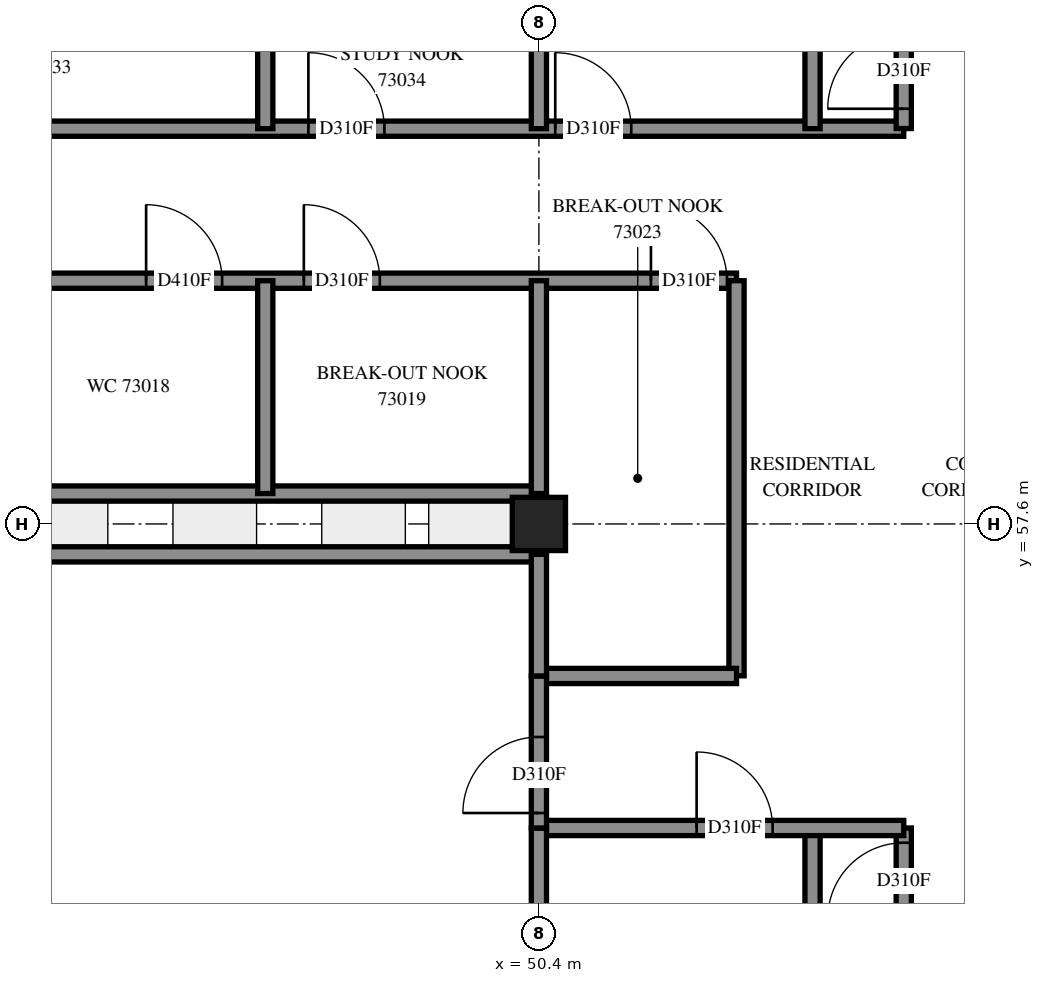
"""IFC4 building model, lengths in metres.
Left out: names, types, materials, properties, quantities, classifications, styles, units other than length and angle.
Written with IfcOpenShell. Run it as: python <this file> out.ifc"""

import sys

from ifc_helpers import new_model, si_unit, direction, frame, frame_2d, origin, origin_2d, place, context, subcontext, project, spatial, rectangle, extrude, element, fill, save


model = new_model("IFC4")
c1 = context("Model", 3, precision=1e-05, world=origin(), true_north=direction((0.0, 1.0)))
c2 = subcontext(c1, "Body", "Model", "MODEL_VIEW")
j1 = project(units=[si_unit("LENGTHUNIT", "METRE"), si_unit("PLANEANGLEUNIT", "RADIAN")], contexts=[c1])
p1 = place(None, origin())
s1 = spatial("IfcSite", under=j1, at=p1, CompositionType="ELEMENT")
p2 = place(p1, origin())
s2 = spatial("IfcBuilding", under=s1, at=p2, CompositionType="ELEMENT")
p3 = place(p2, frame((0.0, 0.0, 267.6)))
s3 = spatial("IfcBuildingStorey", under=s2, at=p3, CompositionType="ELEMENT", Elevation=267.6)
p4 = place(p3, frame((50.4, 57.6, 0.0), z_axis=(0.0, 0.0, 1.0), x_axis=(1.0, 0.0, 0.0)))
e1 = element("IfcColumn", 1, at=p4, inside=s3, PredefinedType="COLUMN", context=c2, shape_type="SweptSolid", body=[
    extrude(rectangle(XDim=0.7, YDim=0.7, at=origin_2d()), origin(), (0.0, 0.0, 1.0), 3.1),
])
p5 = place(p3, frame((36.0, 60.8, 0.0), z_axis=(0.0, 0.0, 1.0), x_axis=(1.0, 0.0, 0.0)))
e2 = element("IfcWall", 2, at=p5, inside=s3, PredefinedType="PARTITIONING", context=c2, shape_type="SweptSolid", body=[
    extrude(rectangle(XDim=17.0, YDim=0.2, at=frame_2d((8.5, 0.0))), origin(), (0.0, 0.0, 1.0), 3.1),
])
p6 = place(p5, frame((2.033, 0.0, 0.0)))
e3 = element("IfcOpeningElement", 3, at=p6, cuts=e2, PredefinedType="OPENING", context=c2, shape_type="SweptSolid", body=[
    extrude(rectangle(XDim=1.0, YDim=2.1, at=frame_2d((0.5, 1.05))), frame((0.0, 0.11, 0.0), z_axis=(0.0, -1.0, 0.0), x_axis=(1.0, 0.0, 0.0)), (0.0, 0.0, 1.0), 0.22),
])
p7 = place(p5, frame((4.107, 0.0, 0.0)))
e4 = element("IfcOpeningElement", 4, at=p7, cuts=e2, PredefinedType="OPENING", context=c2, shape_type="SweptSolid", body=[
    extrude(rectangle(XDim=1.0, YDim=2.1, at=frame_2d((0.5, 1.05))), frame((0.0, 0.11, 0.0), z_axis=(0.0, -1.0, 0.0), x_axis=(1.0, 0.0, 0.0)), (0.0, 0.0, 1.0), 0.22),
])
p8 = place(p5, frame((9.232, 0.0, 0.0)))
e5 = element("IfcOpeningElement", 5, at=p8, cuts=e2, PredefinedType="OPENING", context=c2, shape_type="SweptSolid", body=[
    extrude(rectangle(XDim=1.0, YDim=2.1, at=frame_2d((0.5, 1.05))), frame((0.0, 0.11, 0.0), z_axis=(0.0, -1.0, 0.0), x_axis=(1.0, 0.0, 0.0)), (0.0, 0.0, 1.0), 0.22),
])
p9 = place(p5, frame((11.307, 0.0, 0.0)))
e6 = element("IfcOpeningElement", 6, at=p9, cuts=e2, PredefinedType="OPENING", context=c2, shape_type="SweptSolid", body=[
    extrude(rectangle(XDim=1.0, YDim=2.1, at=frame_2d((0.5, 1.05))), frame((0.0, 0.11, 0.0), z_axis=(0.0, -1.0, 0.0), x_axis=(1.0, 0.0, 0.0)), (0.0, 0.0, 1.0), 0.22),
])
p10 = place(p5, frame((15.874, 0.0, 0.0)))
e7 = element("IfcOpeningElement", 7, at=p10, cuts=e2, PredefinedType="OPENING", context=c2, shape_type="SweptSolid", body=[
    extrude(rectangle(XDim=1.0, YDim=2.1, at=frame_2d((0.5, 1.05))), frame((0.0, 0.11, 0.0), z_axis=(0.0, -1.0, 0.0), x_axis=(1.0, 0.0, 0.0)), (0.0, 0.0, 1.0), 0.22),
])
p11 = place(p3, frame((40.61, 62.8, 0.0), z_axis=(0.0, 0.0, 1.0), x_axis=(1.0, 0.0, 0.0)))
e8 = element("IfcWall", 8, at=p11, inside=s3, PredefinedType="PARTITIONING", context=c2, shape_type="SweptSolid", body=[
    extrude(rectangle(XDim=14.59, YDim=0.2, at=frame_2d((7.295, 0.0))), origin(), (0.0, 0.0, 1.0), 3.1),
])
p12 = place(p11, frame((1.82, 0.0, 0.0)))
e9 = element("IfcOpeningElement", 9, at=p12, cuts=e8, PredefinedType="OPENING", context=c2, shape_type="SweptSolid", body=[
    extrude(rectangle(XDim=1.0, YDim=2.1, at=frame_2d((0.5, 1.05))), frame((0.0, 0.11, 0.0), z_axis=(0.0, -1.0, 0.0), x_axis=(1.0, 0.0, 0.0)), (0.0, 0.0, 1.0), 0.22),
])
p13 = place(p11, frame((6.758, 0.0, 0.0)))
e10 = element("IfcOpeningElement", 10, at=p13, cuts=e8, PredefinedType="OPENING", context=c2, shape_type="SweptSolid", body=[
    extrude(rectangle(XDim=1.0, YDim=2.1, at=frame_2d((0.5, 1.05))), frame((0.0, 0.11, 0.0), z_axis=(0.0, -1.0, 0.0), x_axis=(1.0, 0.0, 0.0)), (0.0, 0.0, 1.0), 0.22),
])
p14 = place(p11, frame((10.005, 0.0, 0.0)))
e11 = element("IfcOpeningElement", 11, at=p14, cuts=e8, PredefinedType="OPENING", context=c2, shape_type="SweptSolid", body=[
    extrude(rectangle(XDim=1.0, YDim=2.1, at=frame_2d((0.5, 1.05))), frame((0.0, 0.11, 0.0), z_axis=(0.0, -1.0, 0.0), x_axis=(1.0, 0.0, 0.0)), (0.0, 0.0, 1.0), 0.22),
])
p15 = place(p3, frame((36.0, 58.0, 0.0), z_axis=(0.0, 0.0, 1.0), x_axis=(1.0, 0.0, 0.0)))
e12 = element("IfcWall", 12, at=p15, inside=s3, PredefinedType="PARTITIONING", context=c2, shape_type="SweptSolid", body=[
    extrude(rectangle(XDim=14.4, YDim=0.2, at=frame_2d((7.2, 0.0))), origin(), (0.0, 0.0, 1.0), 3.1),
])
p16 = place(p3, frame((54.0, 42.285, 0.0), z_axis=(0.0, 0.0, 1.0), x_axis=(0.0, 1.0, 0.0)))
e13 = element("IfcWall", 13, at=p16, inside=s3, PredefinedType="PARTITIONING", context=c2, shape_type="SweptSolid", body=[
    extrude(rectangle(XDim=11.315, YDim=0.2, at=frame_2d((5.657, 0.0))), origin(), (0.0, 0.0, 1.0), 3.1),
])
p17 = place(p3, frame((39.6, 57.2, 0.0), z_axis=(0.0, 0.0, 1.0), x_axis=(1.0, 0.0, 0.0)))
e14 = element("IfcWall", 14, at=p17, inside=s3, PredefinedType="PARTITIONING", context=c2, shape_type="SweptSolid", body=[
    extrude(rectangle(XDim=10.8, YDim=0.2, at=frame_2d((5.4, 0.0))), origin(), (0.0, 0.0, 1.0), 3.1),
])
p18 = place(p3, frame((54.0, 62.8, 0.0), z_axis=(0.0, 0.0, 1.0), x_axis=(0.0, 1.0, 0.0)))
e15 = element("IfcWall", 15, at=p18, inside=s3, PredefinedType="PARTITIONING", context=c2, shape_type="SweptSolid", body=[
    extrude(rectangle(XDim=10.036, YDim=0.2, at=frame_2d((5.018, 0.0))), origin(), (0.0, 0.0, 1.0), 3.1),
])
p19 = place(p3, frame((55.2, 48.0, 0.0), z_axis=(0.0, 0.0, 1.0), x_axis=(0.0, 1.0, 0.0)))
e16 = element("IfcWall", 16, at=p19, inside=s3, PredefinedType="PARTITIONING", context=c2, shape_type="SweptSolid", body=[
    extrude(rectangle(XDim=5.6, YDim=0.2, at=frame_2d((2.8, 0.0))), origin(), (0.0, 0.0, 1.0), 3.1),
])
p20 = place(p19, frame((4.406, 0.0, 0.0)))
e17 = element("IfcOpeningElement", 17, at=p20, cuts=e16, PredefinedType="OPENING", context=c2, shape_type="SweptSolid", body=[
    extrude(rectangle(XDim=1.0, YDim=2.1, at=frame_2d((0.5, 1.05))), frame((0.0, 0.11, 0.0), z_axis=(0.0, -1.0, 0.0), x_axis=(1.0, 0.0, 0.0)), (0.0, 0.0, 1.0), 0.22),
])
p21 = place(p3, frame((53.0, 55.602, 0.0), z_axis=(0.0, 0.0, 1.0), x_axis=(0.0, 1.0, 0.0)))
e18 = element("IfcWall", 18, at=p21, inside=s3, PredefinedType="PARTITIONING", context=c2, shape_type="SweptSolid", body=[
    extrude(rectangle(XDim=5.198, YDim=0.2, at=frame_2d((2.599, 0.0))), origin(), (0.0, 0.0, 1.0), 3.1),
])
p22 = place(p3, frame((50.4, 53.6, 0.0), z_axis=(0.0, 0.0, 1.0), x_axis=(1.0, 0.0, 0.0)))
e19 = element("IfcWall", 19, at=p22, inside=s3, PredefinedType="PARTITIONING", context=c2, shape_type="SweptSolid", body=[
    extrude(rectangle(XDim=4.8, YDim=0.2, at=frame_2d((2.4, 0.0))), origin(), (0.0, 0.0, 1.0), 3.1),
])
p23 = place(p22, frame((2.075, 0.0, 0.0)))
e20 = element("IfcOpeningElement", 20, at=p23, cuts=e19, PredefinedType="OPENING", context=c2, shape_type="SweptSolid", body=[
    extrude(rectangle(XDim=1.0, YDim=2.1, at=frame_2d((0.5, 1.05))), frame((0.0, 0.11, 0.0), z_axis=(0.0, -1.0, 0.0), x_axis=(1.0, 0.0, 0.0)), (0.0, 0.0, 1.0), 0.22),
])
p24 = place(p3, frame((55.2, 62.802, 0.0), z_axis=(0.0, 0.0, 1.0), x_axis=(0.0, 1.0, 0.0)))
e21 = element("IfcWall", 21, at=p24, inside=s3, PredefinedType="PARTITIONING", context=c2, shape_type="SweptSolid", body=[
    extrude(rectangle(XDim=4.398, YDim=0.2, at=frame_2d((2.199, 0.0))), origin(), (0.0, 0.0, 1.0), 3.1),
])
p25 = place(p24, frame((0.26, 0.0, 0.0)))
e22 = element("IfcOpeningElement", 22, at=p25, cuts=e21, PredefinedType="OPENING", context=c2, shape_type="SweptSolid", body=[
    extrude(rectangle(XDim=1.0, YDim=2.1, at=frame_2d((0.5, 1.05))), frame((0.0, 0.11, 0.0), z_axis=(0.0, -1.0, 0.0), x_axis=(1.0, 0.0, 0.0)), (0.0, 0.0, 1.0), 0.22),
])
p26 = place(p3, frame((50.4, 50.75, 0.0), z_axis=(0.0, 0.0, 1.0), x_axis=(0.0, 1.0, 0.0)))
e23 = element("IfcWall", 23, at=p26, inside=s3, PredefinedType="PARTITIONING", context=c2, shape_type="SweptSolid", body=[
    extrude(rectangle(XDim=2.85, YDim=0.2, at=frame_2d((1.425, 0.0))), origin(), (0.0, 0.0, 1.0), 3.1),
])
for number, where, z_axis, x_axis in (
    (24, (46.8, 58.0, 0.0), (0.0, 0.0, 1.0), (0.0, 1.0, 0.0)),
    (25, (50.4, 58.0, 0.0), (0.0, 0.0, 1.0), (0.0, 1.0, 0.0)),
):
    element("IfcWall", number, at=place(p3, frame(where, z_axis=z_axis, x_axis=x_axis)), inside=s3, PredefinedType="PARTITIONING", context=c2, shape_type="SweptSolid", body=[
        extrude(rectangle(XDim=2.8, YDim=0.2, at=frame_2d((1.4, 0.0))), origin(), (0.0, 0.0, 1.0), 3.1),
    ])
p27 = place(p3, frame((50.4, 55.6, 0.0), z_axis=(0.0, 0.0, 1.0), x_axis=(1.0, 0.0, 0.0)))
e26 = element("IfcWall", 26, at=p27, inside=s3, PredefinedType="PARTITIONING", context=c2, shape_type="SweptSolid", body=[
    extrude(rectangle(XDim=2.6, YDim=0.2, at=frame_2d((1.3, 0.0))), origin(), (0.0, 0.0, 1.0), 3.1),
])
p28 = place(p3, frame((50.4, 53.6, 0.0), z_axis=(0.0, 0.0, 1.0), x_axis=(0.0, 1.0, 0.0)))
e27 = element("IfcWall", 27, at=p28, inside=s3, PredefinedType="PARTITIONING", context=c2, shape_type="SweptSolid", body=[
    extrude(rectangle(XDim=2.0, YDim=0.2, at=frame_2d((1.0, 0.0))), origin(), (0.0, 0.0, 1.0), 3.1),
])
p29 = place(p28, frame((0.197, 0.0, 0.0)))
e28 = element("IfcOpeningElement", 28, at=p29, cuts=e27, PredefinedType="OPENING", context=c2, shape_type="SweptSolid", body=[
    extrude(rectangle(XDim=1.0, YDim=2.1, at=frame_2d((0.5, 1.05))), frame((0.0, 0.11, 0.0), z_axis=(0.0, -1.0, 0.0), x_axis=(1.0, 0.0, 0.0)), (0.0, 0.0, 1.0), 0.22),
])
for number, where, z_axis, x_axis in (
    (29, (46.8, 62.8, 0.0), (0.0, 0.0, 1.0), (0.0, 1.0, 0.0)),
    (30, (50.4, 62.8, 0.0), (0.0, 0.0, 1.0), (0.0, 1.0, 0.0)),
    (31, (50.4, 55.6, 0.0), (0.0, 0.0, 1.0), (0.0, 1.0, 0.0)),
):
    element("IfcWall", number, at=place(p3, frame(where, z_axis=z_axis, x_axis=x_axis)), inside=s3, PredefinedType="PARTITIONING", context=c2, shape_type="SweptSolid", body=[
        extrude(rectangle(XDim=1.6, YDim=0.2, at=frame_2d((0.8, 0.0))), origin(), (0.0, 0.0, 1.0), 3.1),
    ])
p30 = place(p8, origin())
e32 = element("IfcDoor", 32, at=p30, inside=s3, OperationType="SINGLE_SWING_LEFT", PredefinedType="DOOR", context=c2, shape_type="SweptSolid", body=[
    extrude(rectangle(XDim=1.0, YDim=2.1, at=frame_2d((0.5, 1.05))), frame((0.0, 0.025, 0.0), z_axis=(0.0, -1.0, 0.0), x_axis=(1.0, 0.0, 0.0)), (0.0, 0.0, 1.0), 0.05),
])
fill(e5, e32)
p31 = place(p9, origin())
e33 = element("IfcDoor", 33, at=p31, inside=s3, OperationType="SINGLE_SWING_RIGHT", PredefinedType="DOOR", context=c2, shape_type="SweptSolid", body=[
    extrude(rectangle(XDim=1.0, YDim=2.1, at=frame_2d((0.5, 1.05))), frame((0.0, 0.025, 0.0), z_axis=(0.0, -1.0, 0.0), x_axis=(1.0, 0.0, 0.0)), (0.0, 0.0, 1.0), 0.05),
])
fill(e6, e33)
p32 = place(p29, origin())
e34 = element("IfcDoor", 34, at=p32, inside=s3, OperationType="SINGLE_SWING_LEFT", PredefinedType="DOOR", context=c2, shape_type="SweptSolid", body=[
    extrude(rectangle(XDim=1.0, YDim=2.1, at=frame_2d((0.5, 1.05))), frame((0.0, 0.025, 0.0), z_axis=(0.0, -1.0, 0.0), x_axis=(1.0, 0.0, 0.0)), (0.0, 0.0, 1.0), 0.05),
])
fill(e28, e34)
p33 = place(p23, origin())
e35 = element("IfcDoor", 35, at=p33, inside=s3, OperationType="SINGLE_SWING_LEFT", PredefinedType="DOOR", context=c2, shape_type="SweptSolid", body=[
    extrude(rectangle(XDim=1.0, YDim=2.1, at=frame_2d((0.5, 1.05))), frame((0.0, 0.025, 0.0), z_axis=(0.0, -1.0, 0.0), x_axis=(1.0, 0.0, 0.0)), (0.0, 0.0, 1.0), 0.05),
])
fill(e20, e35)
p34 = place(p20, origin())
e36 = element("IfcDoor", 36, at=p34, inside=s3, OperationType="SINGLE_SWING_RIGHT", PredefinedType="DOOR", context=c2, shape_type="SweptSolid", body=[
    extrude(rectangle(XDim=1.0, YDim=2.1, at=frame_2d((0.5, 1.05))), frame((0.0, 0.025, 0.0), z_axis=(0.0, -1.0, 0.0), x_axis=(1.0, 0.0, 0.0)), (0.0, 0.0, 1.0), 0.05),
])
fill(e17, e36)
p35 = place(p10, origin())
e37 = element("IfcDoor", 37, at=p35, inside=s3, OperationType="SINGLE_SWING_LEFT", PredefinedType="DOOR", context=c2, shape_type="SweptSolid", body=[
    extrude(rectangle(XDim=1.0, YDim=2.1, at=frame_2d((0.5, 1.05))), frame((0.0, 0.025, 0.0), z_axis=(0.0, -1.0, 0.0), x_axis=(1.0, 0.0, 0.0)), (0.0, 0.0, 1.0), 0.05),
])
fill(e7, e37)
p36 = place(p13, origin())
e38 = element("IfcDoor", 38, at=p36, inside=s3, OperationType="SINGLE_SWING_LEFT", PredefinedType="DOOR", context=c2, shape_type="SweptSolid", body=[
    extrude(rectangle(XDim=1.0, YDim=2.1, at=frame_2d((0.5, 1.05))), frame((0.0, 0.025, 0.0), z_axis=(0.0, -1.0, 0.0), x_axis=(1.0, 0.0, 0.0)), (0.0, 0.0, 1.0), 0.05),
])
fill(e10, e38)
p37 = place(p14, origin())
e39 = element("IfcDoor", 39, at=p37, inside=s3, OperationType="SINGLE_SWING_LEFT", PredefinedType="DOOR", context=c2, shape_type="SweptSolid", body=[
    extrude(rectangle(XDim=1.0, YDim=2.1, at=frame_2d((0.5, 1.05))), frame((0.0, 0.025, 0.0), z_axis=(0.0, -1.0, 0.0), x_axis=(1.0, 0.0, 0.0)), (0.0, 0.0, 1.0), 0.05),
])
fill(e11, e39)
p38 = place(p25, origin())
e40 = element("IfcDoor", 40, at=p38, inside=s3, OperationType="SINGLE_SWING_LEFT", PredefinedType="DOOR", context=c2, shape_type="SweptSolid", body=[
    extrude(rectangle(XDim=1.0, YDim=2.1, at=frame_2d((0.5, 1.05))), frame((0.0, 0.025, 0.0), z_axis=(0.0, -1.0, 0.0), x_axis=(1.0, 0.0, 0.0)), (0.0, 0.0, 1.0), 0.05),
])
fill(e22, e40)
save(model, sys.argv[1])
